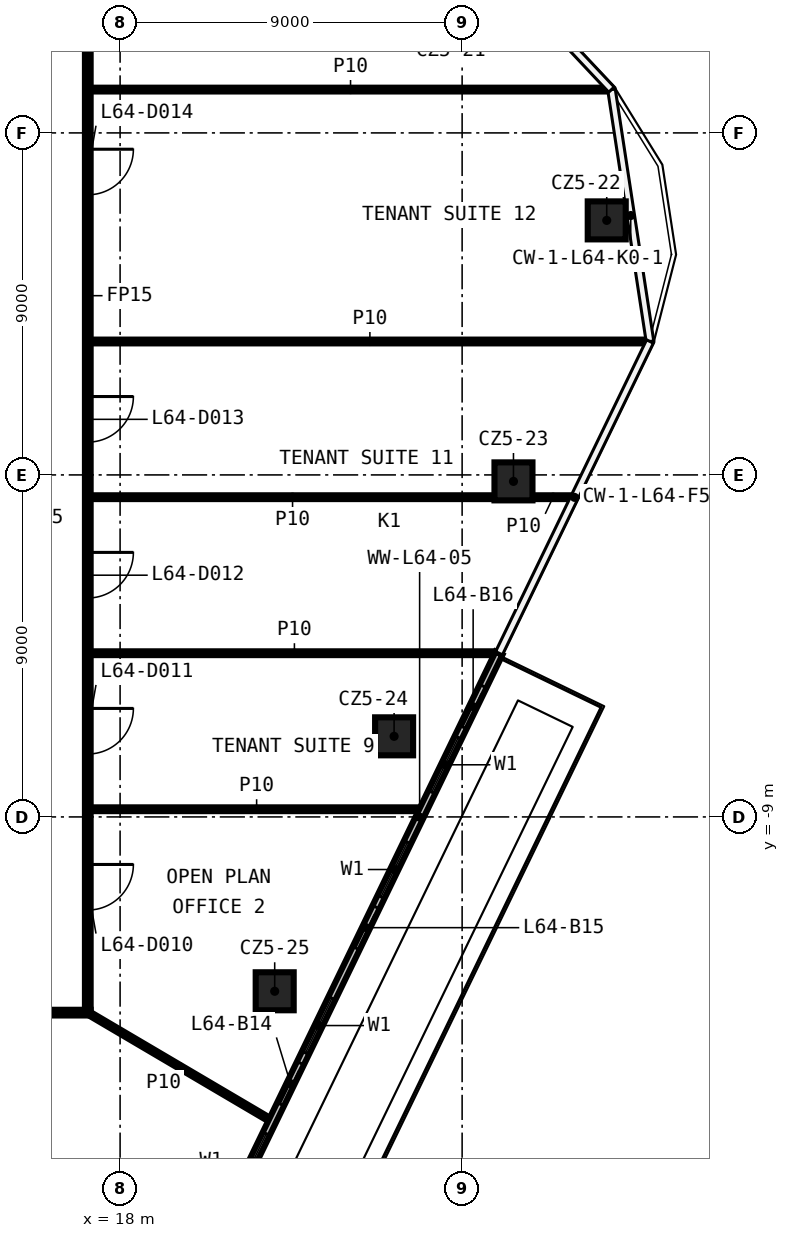
"""IFC4 building model, lengths in metres.
Left out: names, types, materials, properties, quantities, classifications, styles, units other than length and angle.
Written with IfcOpenShell. Run it as: python <this file> out.ifc"""

import sys

from ifc_helpers import new_model, si_unit, direction, frame, frame_2d, origin, origin_2d, place, context, subcontext, project, spatial, rectangle, extrude, element, fill, save


model = new_model("IFC4")
c1 = context("Model", 3, precision=1e-05, world=origin(), true_north=direction((0.0, 1.0)))
c2 = subcontext(c1, "Body", "Model", "MODEL_VIEW")
j1 = project(units=[si_unit("LENGTHUNIT", "METRE"), si_unit("PLANEANGLEUNIT", "RADIAN")], contexts=[c1])
p1 = place(None, origin())
s1 = spatial("IfcSite", under=j1, at=p1, CompositionType="ELEMENT")
p2 = place(p1, origin())
s2 = spatial("IfcBuilding", under=s1, at=p2, CompositionType="ELEMENT")
p3 = place(p2, frame((0.0, 0.0, 302.6)))
s3 = spatial("IfcBuildingStorey", under=s2, at=p3, CompositionType="ELEMENT", Elevation=302.6)
for number, where, z_axis, x_axis in (
    (1, (30.805, 6.698, 0.0), (0.0, 0.0, 1.0), (1.0, 0.0, 0.0)),
    (2, (28.351, -0.17, 0.0), (0.0, 0.0, 1.0), (1.0, 0.0, 0.0)),
    (3, (25.21, -6.879, 0.0), (0.0, 0.0, 1.0), (1.0, 0.0, 0.0)),
    (4, (22.068, -13.588, 0.0), (0.0, 0.0, 1.0), (1.0, 0.0, 0.0)),
):
    element("IfcColumn", number, at=place(p3, frame(where, z_axis=z_axis, x_axis=x_axis)), inside=s3, PredefinedType="COLUMN", context=c2, shape_type="SweptSolid", body=[
        extrude(rectangle(XDim=1.0, YDim=1.0, at=origin_2d()), origin(), (0.0, 0.0, 1.0), 3.82),
    ])
p4 = place(p3, frame((17.225, -14.15, 0.0), z_axis=(0.0, 0.0, 1.0), x_axis=(-1.0, 0.0, 0.0)))
e5 = element("IfcWall", 5, at=p4, inside=s3, PredefinedType="PARTITIONING", context=c2, shape_type="SweptSolid", body=[
    extrude(rectangle(XDim=34.45, YDim=0.15, at=frame_2d((17.225, 0.0))), origin(), (0.0, 0.0, 1.0), 3.82),
])
p5 = place(p4, frame((31.54, 0.0, 0.0)))
e6 = element("IfcOpeningElement", 6, at=p5, cuts=e5, PredefinedType="OPENING", context=c2, shape_type="SweptSolid", body=[
    extrude(rectangle(XDim=1.2, YDim=2.1, at=frame_2d((0.6, 1.05))), frame((0.0, 0.085, 0.0), z_axis=(0.0, -1.0, 0.0), x_axis=(1.0, 0.0, 0.0)), (0.0, 0.0, 1.0), 0.17),
])
p6 = place(p4, frame((25.804, 0.0, 0.0)))
e7 = element("IfcOpeningElement", 7, at=p6, cuts=e5, PredefinedType="OPENING", context=c2, shape_type="SweptSolid", body=[
    extrude(rectangle(XDim=1.2, YDim=2.1, at=frame_2d((0.6, 1.05))), frame((0.0, 0.085, 0.0), z_axis=(0.0, -1.0, 0.0), x_axis=(1.0, 0.0, 0.0)), (0.0, 0.0, 1.0), 0.17),
])
p7 = place(p4, frame((17.681, 0.0, 0.0)))
e8 = element("IfcOpeningElement", 8, at=p7, cuts=e5, PredefinedType="OPENING", context=c2, shape_type="SweptSolid", body=[
    extrude(rectangle(XDim=1.2, YDim=2.1, at=frame_2d((0.6, 1.05))), frame((0.0, 0.085, 0.0), z_axis=(0.0, -1.0, 0.0), x_axis=(1.0, 0.0, 0.0)), (0.0, 0.0, 1.0), 0.17),
])
p8 = place(p4, frame((10.752, 0.0, 0.0)))
e9 = element("IfcOpeningElement", 9, at=p8, cuts=e5, PredefinedType="OPENING", context=c2, shape_type="SweptSolid", body=[
    extrude(rectangle(XDim=1.2, YDim=2.1, at=frame_2d((0.6, 1.05))), frame((0.0, 0.085, 0.0), z_axis=(0.0, -1.0, 0.0), x_axis=(1.0, 0.0, 0.0)), (0.0, 0.0, 1.0), 0.17),
])
p9 = place(p4, frame((6.133, 0.0, 0.0)))
e10 = element("IfcOpeningElement", 10, at=p9, cuts=e5, PredefinedType="OPENING", context=c2, shape_type="SweptSolid", body=[
    extrude(rectangle(XDim=1.2, YDim=2.1, at=frame_2d((0.6, 1.05))), frame((0.0, 0.085, 0.0), z_axis=(0.0, -1.0, 0.0), x_axis=(1.0, 0.0, 0.0)), (0.0, 0.0, 1.0), 0.17),
])
p10 = place(p4, frame((1.851, 0.0, 0.0)))
e11 = element("IfcOpeningElement", 11, at=p10, cuts=e5, PredefinedType="OPENING", context=c2, shape_type="SweptSolid", body=[
    extrude(rectangle(XDim=1.2, YDim=2.1, at=frame_2d((0.6, 1.05))), frame((0.0, 0.085, 0.0), z_axis=(0.0, -1.0, 0.0), x_axis=(1.0, 0.0, 0.0)), (0.0, 0.0, 1.0), 0.17),
])
p11 = place(p3, frame((17.225, -8.798, 0.0), z_axis=(0.0, 0.0, 1.0), x_axis=(1.0, 0.0, 0.0)))
e12 = element("IfcWall", 12, at=p11, inside=s3, PredefinedType="PARTITIONING", context=c2, shape_type="SweptSolid", body=[
    extrude(rectangle(XDim=8.735, YDim=0.1, at=frame_2d((4.368, 0.0))), origin(), (0.0, 0.0, 1.0), 3.82),
])
p12 = place(p3, frame((17.225, -4.692, 0.0), z_axis=(0.0, 0.0, 1.0), x_axis=(1.0, 0.0, 0.0)))
e13 = element("IfcWall", 13, at=p12, inside=s3, PredefinedType="PARTITIONING", context=c2, shape_type="SweptSolid", body=[
    extrude(rectangle(XDim=10.723, YDim=0.1, at=frame_2d((5.362, 0.0))), origin(), (0.0, 0.0, 1.0), 3.82),
])
p13 = place(p3, frame((17.225, -0.586, 0.0), z_axis=(0.0, 0.0, 1.0), x_axis=(1.0, 0.0, 0.0)))
e14 = element("IfcWall", 14, at=p13, inside=s3, PredefinedType="PARTITIONING", context=c2, shape_type="SweptSolid", body=[
    extrude(rectangle(XDim=10.626, YDim=0.1, at=frame_2d((5.313, 0.0))), origin(), (0.0, 0.0, 1.0), 3.82),
])
p14 = place(p3, frame((28.851, -0.586, 0.0), z_axis=(0.0, 0.0, 1.0), x_axis=(1.0, 0.0, 0.0)))
e15 = element("IfcWall", 15, at=p14, inside=s3, PredefinedType="PARTITIONING", context=c2, shape_type="SweptSolid", body=[
    extrude(rectangle(XDim=1.086, YDim=0.1, at=frame_2d((0.543, 0.0))), origin(), (0.0, 0.0, 1.0), 3.82),
])
p15 = place(p3, frame((17.225, 3.511, 0.0), z_axis=(0.0, 0.0, 1.0), x_axis=(1.0, 0.0, 0.0)))
e16 = element("IfcWall", 16, at=p15, inside=s3, PredefinedType="PARTITIONING", context=c2, shape_type="SweptSolid", body=[
    extrude(rectangle(XDim=14.696, YDim=0.1, at=frame_2d((7.348, 0.0))), origin(), (0.0, 0.0, 1.0), 3.82),
])
p16 = place(p3, frame((17.225, 10.14, 0.0), z_axis=(0.0, 0.0, 1.0), x_axis=(1.0, 0.0, 0.0)))
e17 = element("IfcWall", 17, at=p16, inside=s3, PredefinedType="PARTITIONING", context=c2, shape_type="SweptSolid", body=[
    extrude(rectangle(XDim=13.677, YDim=0.1, at=frame_2d((6.839, 0.0))), origin(), (0.0, 0.0, 1.0), 3.82),
])
p17 = place(p3, frame((17.15, 14.075, 0.0), z_axis=(0.0, 0.0, 1.0), x_axis=(0.0, -1.0, 0.0)))
e18 = element("IfcWall", 18, at=p17, inside=s3, PredefinedType="PARTITIONING", context=c2, shape_type="SweptSolid", body=[
    extrude(rectangle(XDim=28.15, YDim=0.15, at=frame_2d((14.075, 0.0))), origin(), (0.0, 0.0, 1.0), 3.82),
])
p18 = place(p17, frame((24.326, 0.0, 0.0)))
e19 = element("IfcOpeningElement", 19, at=p18, cuts=e18, PredefinedType="OPENING", context=c2, shape_type="SweptSolid", body=[
    extrude(rectangle(XDim=1.2, YDim=2.1, at=frame_2d((0.6, 1.05))), frame((0.0, 0.085, 0.0), z_axis=(0.0, -1.0, 0.0), x_axis=(1.0, 0.0, 0.0)), (0.0, 0.0, 1.0), 0.17),
])
p19 = place(p17, frame((20.22, 0.0, 0.0)))
e20 = element("IfcOpeningElement", 20, at=p19, cuts=e18, PredefinedType="OPENING", context=c2, shape_type="SweptSolid", body=[
    extrude(rectangle(XDim=1.2, YDim=2.1, at=frame_2d((0.6, 1.05))), frame((0.0, 0.085, 0.0), z_axis=(0.0, -1.0, 0.0), x_axis=(1.0, 0.0, 0.0)), (0.0, 0.0, 1.0), 0.17),
])
p20 = place(p17, frame((16.114, 0.0, 0.0)))
e21 = element("IfcOpeningElement", 21, at=p20, cuts=e18, PredefinedType="OPENING", context=c2, shape_type="SweptSolid", body=[
    extrude(rectangle(XDim=1.2, YDim=2.1, at=frame_2d((0.6, 1.05))), frame((0.0, 0.085, 0.0), z_axis=(0.0, -1.0, 0.0), x_axis=(1.0, 0.0, 0.0)), (0.0, 0.0, 1.0), 0.17),
])
p21 = place(p17, frame((12.012, 0.0, 0.0)))
e22 = element("IfcOpeningElement", 22, at=p21, cuts=e18, PredefinedType="OPENING", context=c2, shape_type="SweptSolid", body=[
    extrude(rectangle(XDim=1.2, YDim=2.1, at=frame_2d((0.6, 1.05))), frame((0.0, 0.085, 0.0), z_axis=(0.0, -1.0, 0.0), x_axis=(1.0, 0.0, 0.0)), (0.0, 0.0, 1.0), 0.17),
])
p22 = place(p17, frame((5.504, 0.0, 0.0)))
e23 = element("IfcOpeningElement", 23, at=p22, cuts=e18, PredefinedType="OPENING", context=c2, shape_type="SweptSolid", body=[
    extrude(rectangle(XDim=1.2, YDim=2.1, at=frame_2d((0.6, 1.05))), frame((0.0, 0.085, 0.0), z_axis=(0.0, -1.0, 0.0), x_axis=(1.0, 0.0, 0.0)), (0.0, 0.0, 1.0), 0.17),
])
p23 = place(p17, frame((1.622, 0.0, 0.0)))
e24 = element("IfcOpeningElement", 24, at=p23, cuts=e18, PredefinedType="OPENING", context=c2, shape_type="SweptSolid", body=[
    extrude(rectangle(XDim=1.2, YDim=2.1, at=frame_2d((0.6, 1.05))), frame((0.0, 0.085, 0.0), z_axis=(0.0, -1.0, 0.0), x_axis=(1.0, 0.0, 0.0)), (0.0, 0.0, 1.0), 0.17),
])
p24 = place(p3, frame((17.15, -14.15, 0.0), z_axis=(0.0, 0.0, 1.0), x_axis=(0.861619958058, -0.507553985184, 0.0)))
e25 = element("IfcWall", 25, at=p24, inside=s3, PredefinedType="PARTITIONING", context=c2, shape_type="SweptSolid", body=[
    extrude(rectangle(XDim=5.615, YDim=0.1, at=frame_2d((2.808, 0.0))), origin(), (0.0, 0.0, 1.0), 3.82),
])
p25 = place(p3, frame((20.017, -21.116, 0.0), z_axis=(0.0, 0.0, 1.0), x_axis=(0.435859541182, 0.90001470008, 0.0)))
e26 = element("IfcWall", 26, at=p25, inside=s3, PredefinedType="SOLIDWALL", context=c2, shape_type="SweptSolid", body=[
    extrude(rectangle(XDim=18.249, YDim=0.2, at=frame_2d((9.125, 0.0))), origin(), (0.0, 0.0, 1.0), 3.82),
])
p26 = place(p25, frame((2.6, 0.0, 0.6)))
e27 = element("IfcOpeningElement", 27, at=p26, cuts=e26, PredefinedType="OPENING", context=c2, shape_type="SweptSolid", body=[
    extrude(rectangle(XDim=1.6, YDim=2.4, at=frame_2d((0.8, 1.2))), frame((0.0, 0.11, 0.0), z_axis=(0.0, -1.0, 0.0), x_axis=(1.0, 0.0, 0.0)), (0.0, 0.0, 1.0), 0.22),
])
p27 = place(p25, frame((1.1, 0.0, 0.0)))
e28 = element("IfcOpeningElement", 28, at=p27, cuts=e26, PredefinedType="OPENING", context=c2, shape_type="SweptSolid", body=[
    extrude(rectangle(XDim=1.2, YDim=2.4, at=frame_2d((0.6, 1.2))), frame((0.0, 0.11, 0.0), z_axis=(0.0, -1.0, 0.0), x_axis=(1.0, 0.0, 0.0)), (0.0, 0.0, 1.0), 0.22),
])
p28 = place(p25, frame((6.562, 0.0, 0.6)))
e29 = element("IfcOpeningElement", 29, at=p28, cuts=e26, PredefinedType="OPENING", context=c2, shape_type="SweptSolid", body=[
    extrude(rectangle(XDim=1.6, YDim=2.4, at=frame_2d((0.8, 1.2))), frame((0.0, 0.11, 0.0), z_axis=(0.0, -1.0, 0.0), x_axis=(1.0, 0.0, 0.0)), (0.0, 0.0, 1.0), 0.22),
])
p29 = place(p25, frame((5.062, 0.0, 0.0)))
e30 = element("IfcOpeningElement", 30, at=p29, cuts=e26, PredefinedType="OPENING", context=c2, shape_type="SweptSolid", body=[
    extrude(rectangle(XDim=1.2, YDim=2.4, at=frame_2d((0.6, 1.2))), frame((0.0, 0.11, 0.0), z_axis=(0.0, -1.0, 0.0), x_axis=(1.0, 0.0, 0.0)), (0.0, 0.0, 1.0), 0.22),
])
p30 = place(p25, frame((11.125, 0.0, 0.6)))
e31 = element("IfcOpeningElement", 31, at=p30, cuts=e26, PredefinedType="OPENING", context=c2, shape_type="SweptSolid", body=[
    extrude(rectangle(XDim=1.6, YDim=2.4, at=frame_2d((0.8, 1.2))), frame((0.0, 0.11, 0.0), z_axis=(0.0, -1.0, 0.0), x_axis=(1.0, 0.0, 0.0)), (0.0, 0.0, 1.0), 0.22),
])
p31 = place(p25, frame((9.625, 0.0, 0.0)))
e32 = element("IfcOpeningElement", 32, at=p31, cuts=e26, PredefinedType="OPENING", context=c2, shape_type="SweptSolid", body=[
    extrude(rectangle(XDim=1.2, YDim=2.4, at=frame_2d((0.6, 1.2))), frame((0.0, 0.11, 0.0), z_axis=(0.0, -1.0, 0.0), x_axis=(1.0, 0.0, 0.0)), (0.0, 0.0, 1.0), 0.22),
])
p32 = place(p25, frame((14.187, 0.0, 0.6)))
e33 = element("IfcOpeningElement", 33, at=p32, cuts=e26, PredefinedType="OPENING", context=c2, shape_type="SweptSolid", body=[
    extrude(rectangle(XDim=1.6, YDim=2.4, at=frame_2d((0.8, 1.2))), frame((0.0, 0.11, 0.0), z_axis=(0.0, -1.0, 0.0), x_axis=(1.0, 0.0, 0.0)), (0.0, 0.0, 1.0), 0.22),
])
p33 = place(p25, frame((16.087, 0.0, 0.0)))
e34 = element("IfcOpeningElement", 34, at=p33, cuts=e26, PredefinedType="OPENING", context=c2, shape_type="SweptSolid", body=[
    extrude(rectangle(XDim=1.2, YDim=2.4, at=frame_2d((0.6, 1.2))), frame((0.0, 0.11, 0.0), z_axis=(0.0, -1.0, 0.0), x_axis=(1.0, 0.0, 0.0)), (0.0, 0.0, 1.0), 0.22),
])
p34 = place(p18, origin())
e35 = element("IfcDoor", 35, at=p34, inside=s3, OperationType="SINGLE_SWING_LEFT", PredefinedType="DOOR", context=c2, shape_type="SweptSolid", body=[
    extrude(rectangle(XDim=1.2, YDim=2.1, at=frame_2d((0.6, 1.05))), frame((0.0, 0.025, 0.0), z_axis=(0.0, -1.0, 0.0), x_axis=(1.0, 0.0, 0.0)), (0.0, 0.0, 1.0), 0.05),
])
fill(e19, e35)
p35 = place(p19, origin())
e36 = element("IfcDoor", 36, at=p35, inside=s3, OperationType="SINGLE_SWING_RIGHT", PredefinedType="DOOR", context=c2, shape_type="SweptSolid", body=[
    extrude(rectangle(XDim=1.2, YDim=2.1, at=frame_2d((0.6, 1.05))), frame((0.0, 0.025, 0.0), z_axis=(0.0, -1.0, 0.0), x_axis=(1.0, 0.0, 0.0)), (0.0, 0.0, 1.0), 0.05),
])
fill(e20, e36)
p36 = place(p20, origin())
e37 = element("IfcDoor", 37, at=p36, inside=s3, OperationType="SINGLE_SWING_LEFT", PredefinedType="DOOR", context=c2, shape_type="SweptSolid", body=[
    extrude(rectangle(XDim=1.2, YDim=2.1, at=frame_2d((0.6, 1.05))), frame((0.0, 0.025, 0.0), z_axis=(0.0, -1.0, 0.0), x_axis=(1.0, 0.0, 0.0)), (0.0, 0.0, 1.0), 0.05),
])
fill(e21, e37)
p37 = place(p21, origin())
e38 = element("IfcDoor", 38, at=p37, inside=s3, OperationType="SINGLE_SWING_RIGHT", PredefinedType="DOOR", context=c2, shape_type="SweptSolid", body=[
    extrude(rectangle(XDim=1.2, YDim=2.1, at=frame_2d((0.6, 1.05))), frame((0.0, 0.025, 0.0), z_axis=(0.0, -1.0, 0.0), x_axis=(1.0, 0.0, 0.0)), (0.0, 0.0, 1.0), 0.05),
])
fill(e22, e38)
p38 = place(p22, origin())
e39 = element("IfcDoor", 39, at=p38, inside=s3, OperationType="SINGLE_SWING_LEFT", PredefinedType="DOOR", context=c2, shape_type="SweptSolid", body=[
    extrude(rectangle(XDim=1.2, YDim=2.1, at=frame_2d((0.6, 1.05))), frame((0.0, 0.025, 0.0), z_axis=(0.0, -1.0, 0.0), x_axis=(1.0, 0.0, 0.0)), (0.0, 0.0, 1.0), 0.05),
])
fill(e23, e39)
p39 = place(p26, origin())
e40 = element("IfcWindow", 40, at=p39, inside=s3, PartitioningType="SINGLE_PANEL", PredefinedType="WINDOW", context=c2, shape_type="SweptSolid", body=[
    extrude(rectangle(XDim=1.6, YDim=2.4, at=frame_2d((0.8, 1.2))), frame((0.0, 0.03, 0.0), z_axis=(0.0, -1.0, 0.0), x_axis=(1.0, 0.0, 0.0)), (0.0, 0.0, 1.0), 0.06),
])
fill(e27, e40)
p40 = place(p28, origin())
e41 = element("IfcWindow", 41, at=p40, inside=s3, PartitioningType="SINGLE_PANEL", PredefinedType="WINDOW", context=c2, shape_type="SweptSolid", body=[
    extrude(rectangle(XDim=1.6, YDim=2.4, at=frame_2d((0.8, 1.2))), frame((0.0, 0.03, 0.0), z_axis=(0.0, -1.0, 0.0), x_axis=(1.0, 0.0, 0.0)), (0.0, 0.0, 1.0), 0.06),
])
fill(e29, e41)
p41 = place(p29, origin())
e42 = element("IfcDoor", 42, at=p41, inside=s3, OperationType="SLIDING_TO_LEFT", PredefinedType="DOOR", context=c2, shape_type="SweptSolid", body=[
    extrude(rectangle(XDim=1.2, YDim=2.4, at=frame_2d((0.6, 1.2))), frame((0.0, 0.025, 0.0), z_axis=(0.0, -1.0, 0.0), x_axis=(1.0, 0.0, 0.0)), (0.0, 0.0, 1.0), 0.05),
])
fill(e30, e42)
p42 = place(p30, origin())
e43 = element("IfcWindow", 43, at=p42, inside=s3, PartitioningType="SINGLE_PANEL", PredefinedType="WINDOW", context=c2, shape_type="SweptSolid", body=[
    extrude(rectangle(XDim=1.6, YDim=2.4, at=frame_2d((0.8, 1.2))), frame((0.0, 0.03, 0.0), z_axis=(0.0, -1.0, 0.0), x_axis=(1.0, 0.0, 0.0)), (0.0, 0.0, 1.0), 0.06),
])
fill(e31, e43)
p43 = place(p31, origin())
e44 = element("IfcDoor", 44, at=p43, inside=s3, OperationType="SLIDING_TO_LEFT", PredefinedType="DOOR", context=c2, shape_type="SweptSolid", body=[
    extrude(rectangle(XDim=1.2, YDim=2.4, at=frame_2d((0.6, 1.2))), frame((0.0, 0.025, 0.0), z_axis=(0.0, -1.0, 0.0), x_axis=(1.0, 0.0, 0.0)), (0.0, 0.0, 1.0), 0.05),
])
fill(e32, e44)
p44 = place(p32, origin())
e45 = element("IfcWindow", 45, at=p44, inside=s3, PartitioningType="SINGLE_PANEL", PredefinedType="WINDOW", context=c2, shape_type="SweptSolid", body=[
    extrude(rectangle(XDim=1.6, YDim=2.4, at=frame_2d((0.8, 1.2))), frame((0.0, 0.03, 0.0), z_axis=(0.0, -1.0, 0.0), x_axis=(1.0, 0.0, 0.0)), (0.0, 0.0, 1.0), 0.06),
])
fill(e33, e45)
p45 = place(p33, origin())
e46 = element("IfcDoor", 46, at=p45, inside=s3, OperationType="SLIDING_TO_LEFT", PredefinedType="DOOR", context=c2, shape_type="SweptSolid", body=[
    extrude(rectangle(XDim=1.2, YDim=2.4, at=frame_2d((0.6, 1.2))), frame((0.0, 0.025, 0.0), z_axis=(0.0, -1.0, 0.0), x_axis=(1.0, 0.0, 0.0)), (0.0, 0.0, 1.0), 0.05),
])
fill(e34, e46)
save(model, sys.argv[1])
